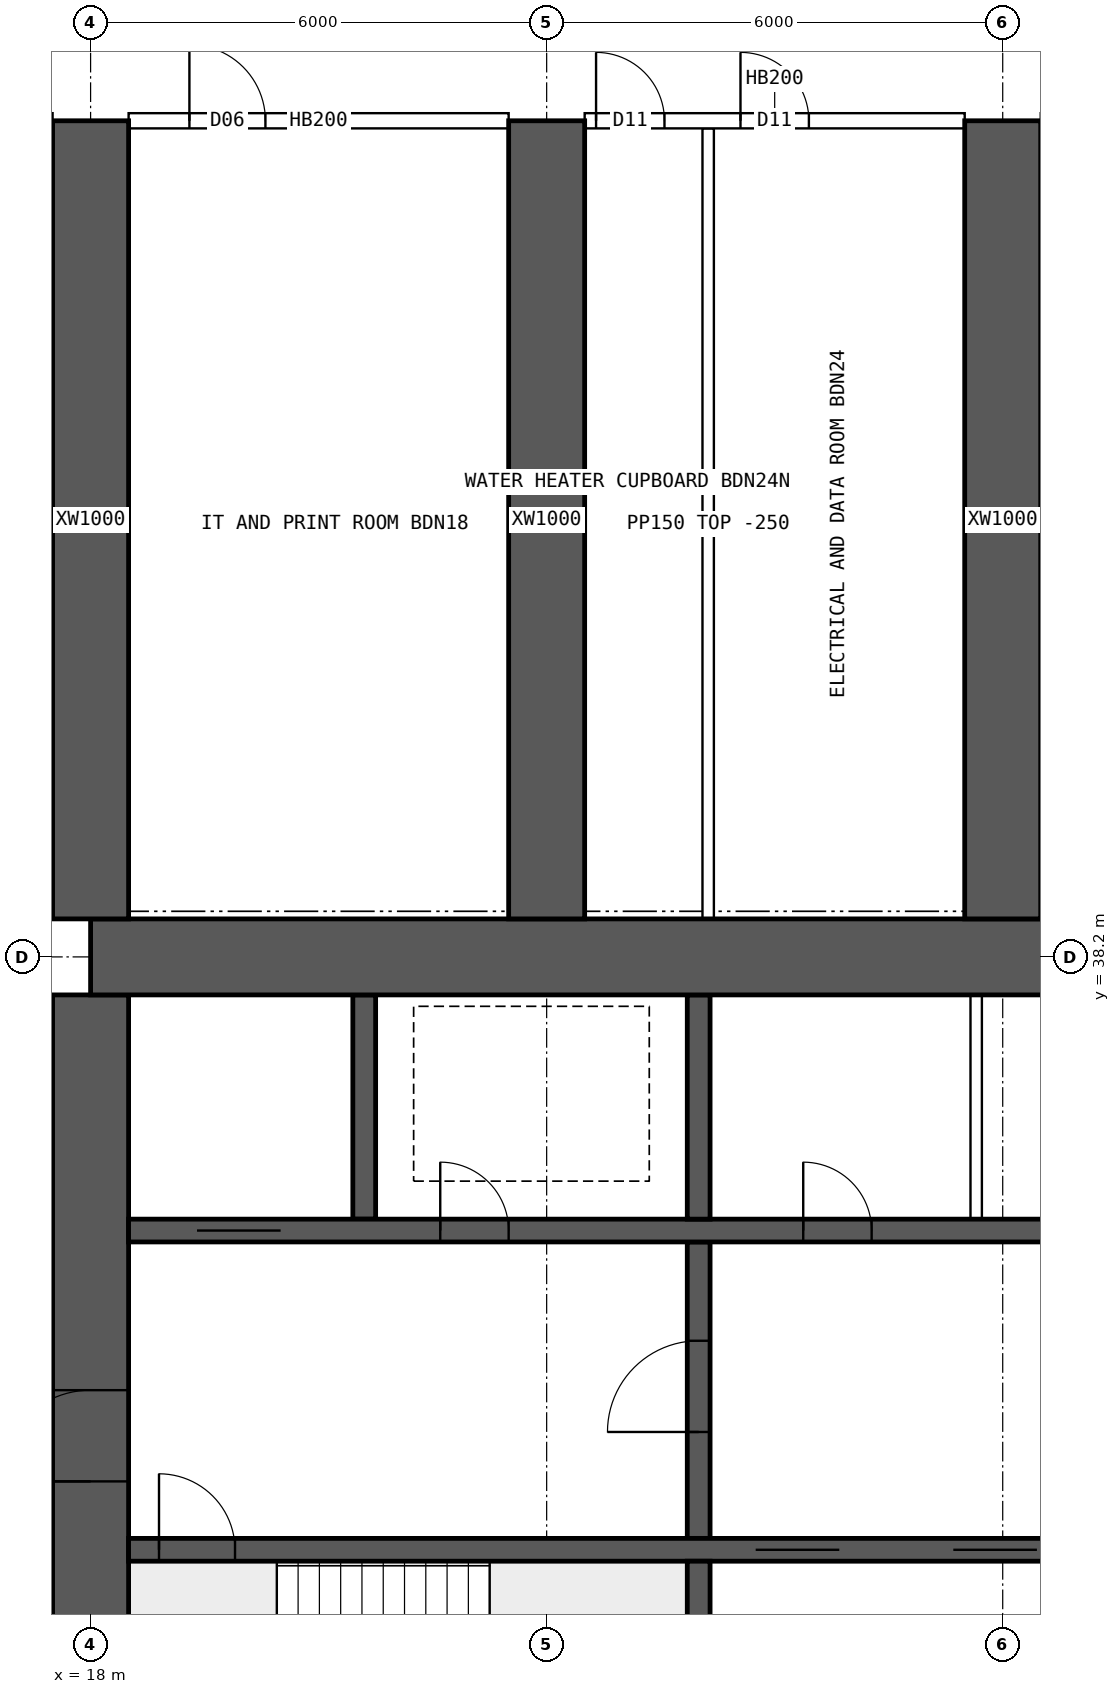
"""IFC4 building model, lengths in metres.
Left out: names, types, materials, properties, quantities, classifications, styles, units other than length and angle.
Written with IfcOpenShell. Run it as: python <this file> out.ifc"""

import sys

from ifc_helpers import new_model, si_unit, direction, frame, frame_2d, origin, place, context, subcontext, project, spatial, rectangle, extrude, element, fill, save


model = new_model("IFC4")
c1 = context("Model", 3, precision=1e-05, world=origin(), true_north=direction((0.0, 1.0)))
c2 = subcontext(c1, "Body", "Model", "MODEL_VIEW")
j1 = project(units=[si_unit("LENGTHUNIT", "METRE"), si_unit("PLANEANGLEUNIT", "RADIAN")], contexts=[c1])
p1 = place(None, origin())
s1 = spatial("IfcSite", under=j1, at=p1, CompositionType="ELEMENT")
p2 = place(p1, origin())
s2 = spatial("IfcBuilding", under=s1, at=p2, CompositionType="ELEMENT")
p3 = place(p2, frame((0.0, 0.0, 23.95)))
s3 = spatial("IfcBuildingStorey", under=s2, at=p3, CompositionType="ELEMENT", Elevation=23.95)
p4 = place(p3, frame((18.0, 38.2, 0.0), z_axis=(0.0, 0.0, 1.0), x_axis=(1.0, 0.0, 0.0)))
e1 = element("IfcWall", 1, at=p4, inside=s3, PredefinedType="SHEAR", context=c2, shape_type="SweptSolid", body=[
    extrude(rectangle(XDim=48.0, YDim=1.0, at=frame_2d((24.0, 0.0))), origin(), (0.0, 0.0, 1.0), 3.75),
])
p5 = place(p3, frame((18.0, 26.3, 0.0), z_axis=(0.0, 0.0, 1.0), x_axis=(0.0, 1.0, 0.0)))
e2 = element("IfcWall", 2, at=p5, inside=s3, PredefinedType="SHEAR", context=c2, shape_type="SweptSolid", body=[
    extrude(rectangle(XDim=11.4, YDim=1.0, at=frame_2d((5.7, 0.0))), origin(), (0.0, 0.0, 1.0), 3.75),
])
p6 = place(p5, frame((5.0, 0.0, 0.0)))
e3 = element("IfcOpeningElement", 3, at=p6, cuts=e2, PredefinedType="OPENING", context=c2, shape_type="SweptSolid", body=[
    extrude(rectangle(XDim=1.2, YDim=2.1, at=frame_2d((0.6, 1.05))), frame((0.0, 0.51, 0.0), z_axis=(0.0, -1.0, 0.0), x_axis=(1.0, 0.0, 0.0)), (0.0, 0.0, 1.0), 1.02),
])
p7 = place(p3, frame((18.5, 30.4, 0.0), z_axis=(0.0, 0.0, 1.0), x_axis=(1.0, 0.0, 0.0)))
e4 = element("IfcWall", 4, at=p7, inside=s3, PredefinedType="SHEAR", context=c2, shape_type="SweptSolid", body=[
    extrude(rectangle(XDim=47.0, YDim=0.3, at=frame_2d((23.5, 0.0))), origin(), (0.0, 0.0, 1.0), 3.75),
])
p8 = place(p7, frame((0.4, 0.0, 0.0)))
e5 = element("IfcOpeningElement", 5, at=p8, cuts=e4, PredefinedType="OPENING", context=c2, shape_type="SweptSolid", body=[
    extrude(rectangle(XDim=1.0, YDim=2.1, at=frame_2d((0.5, 1.05))), frame((0.0, 0.16, 0.0), z_axis=(0.0, -1.0, 0.0), x_axis=(1.0, 0.0, 0.0)), (0.0, 0.0, 1.0), 0.32),
])
p9 = place(p7, frame((45.6, 0.0, 0.0)))
e6 = element("IfcOpeningElement", 6, at=p9, cuts=e4, PredefinedType="OPENING", context=c2, shape_type="SweptSolid", body=[
    extrude(rectangle(XDim=1.0, YDim=2.1, at=frame_2d((0.5, 1.05))), frame((0.0, 0.16, 0.0), z_axis=(0.0, -1.0, 0.0), x_axis=(1.0, 0.0, 0.0)), (0.0, 0.0, 1.0), 0.32),
])
p10 = place(p7, frame((8.25, 0.0, 0.0)))
e7 = element("IfcOpeningElement", 7, at=p10, cuts=e4, PredefinedType="OPENING", context=c2, shape_type="SweptSolid", body=[
    extrude(rectangle(XDim=1.1, YDim=2.1, at=frame_2d((0.55, 1.05))), frame((0.0, 0.16, 0.0), z_axis=(0.0, -1.0, 0.0), x_axis=(1.0, 0.0, 0.0)), (0.0, 0.0, 1.0), 0.32),
])
p11 = place(p7, frame((10.85, 0.0, 0.0)))
e8 = element("IfcOpeningElement", 8, at=p11, cuts=e4, PredefinedType="OPENING", context=c2, shape_type="SweptSolid", body=[
    extrude(rectangle(XDim=1.1, YDim=2.1, at=frame_2d((0.55, 1.05))), frame((0.0, 0.16, 0.0), z_axis=(0.0, -1.0, 0.0), x_axis=(1.0, 0.0, 0.0)), (0.0, 0.0, 1.0), 0.32),
])
p12 = place(p7, frame((13.45, 0.0, 0.0)))
e9 = element("IfcOpeningElement", 9, at=p12, cuts=e4, PredefinedType="OPENING", context=c2, shape_type="SweptSolid", body=[
    extrude(rectangle(XDim=1.1, YDim=2.1, at=frame_2d((0.55, 1.05))), frame((0.0, 0.16, 0.0), z_axis=(0.0, -1.0, 0.0), x_axis=(1.0, 0.0, 0.0)), (0.0, 0.0, 1.0), 0.32),
])
p13 = place(p7, frame((16.05, 0.0, 0.0)))
e10 = element("IfcOpeningElement", 10, at=p13, cuts=e4, PredefinedType="OPENING", context=c2, shape_type="SweptSolid", body=[
    extrude(rectangle(XDim=1.1, YDim=2.1, at=frame_2d((0.55, 1.05))), frame((0.0, 0.16, 0.0), z_axis=(0.0, -1.0, 0.0), x_axis=(1.0, 0.0, 0.0)), (0.0, 0.0, 1.0), 0.32),
])
p14 = place(p7, frame((30.117, 0.0, 0.0)))
e11 = element("IfcOpeningElement", 11, at=p14, cuts=e4, PredefinedType="OPENING", context=c2, shape_type="SweptSolid", body=[
    extrude(rectangle(XDim=1.1, YDim=2.1, at=frame_2d((0.55, 1.05))), frame((0.0, 0.16, 0.0), z_axis=(0.0, -1.0, 0.0), x_axis=(1.0, 0.0, 0.0)), (0.0, 0.0, 1.0), 0.32),
])
p15 = place(p7, frame((33.65, 0.0, 0.0)))
e12 = element("IfcOpeningElement", 12, at=p15, cuts=e4, PredefinedType="OPENING", context=c2, shape_type="SweptSolid", body=[
    extrude(rectangle(XDim=1.1, YDim=2.1, at=frame_2d((0.55, 1.05))), frame((0.0, 0.16, 0.0), z_axis=(0.0, -1.0, 0.0), x_axis=(1.0, 0.0, 0.0)), (0.0, 0.0, 1.0), 0.32),
])
p16 = place(p7, frame((37.183, 0.0, 0.0)))
e13 = element("IfcOpeningElement", 13, at=p16, cuts=e4, PredefinedType="OPENING", context=c2, shape_type="SweptSolid", body=[
    extrude(rectangle(XDim=1.1, YDim=2.1, at=frame_2d((0.55, 1.05))), frame((0.0, 0.16, 0.0), z_axis=(0.0, -1.0, 0.0), x_axis=(1.0, 0.0, 0.0)), (0.0, 0.0, 1.0), 0.32),
])
p17 = place(p3, frame((18.5, 34.6, 0.0), z_axis=(0.0, 0.0, 1.0), x_axis=(1.0, 0.0, 0.0)))
e14 = element("IfcWall", 14, at=p17, inside=s3, PredefinedType="SHEAR", context=c2, shape_type="SweptSolid", body=[
    extrude(rectangle(XDim=47.0, YDim=0.3, at=frame_2d((23.5, 0.0))), origin(), (0.0, 0.0, 1.0), 3.75),
])
p18 = place(p17, frame((0.9, 0.0, 0.0)))
e15 = element("IfcOpeningElement", 15, at=p18, cuts=e14, PredefinedType="OPENING", context=c2, shape_type="SweptSolid", body=[
    extrude(rectangle(XDim=1.1, YDim=2.1, at=frame_2d((0.55, 1.05))), frame((0.0, 0.16, 0.0), z_axis=(0.0, -1.0, 0.0), x_axis=(1.0, 0.0, 0.0)), (0.0, 0.0, 1.0), 0.32),
])
p19 = place(p17, frame((45.0, 0.0, 0.0)))
e16 = element("IfcOpeningElement", 16, at=p19, cuts=e14, PredefinedType="OPENING", context=c2, shape_type="SweptSolid", body=[
    extrude(rectangle(XDim=1.1, YDim=2.1, at=frame_2d((0.55, 1.05))), frame((0.0, 0.16, 0.0), z_axis=(0.0, -1.0, 0.0), x_axis=(1.0, 0.0, 0.0)), (0.0, 0.0, 1.0), 0.32),
])
p20 = place(p17, frame((4.1, 0.0, 0.0)))
e17 = element("IfcOpeningElement", 17, at=p20, cuts=e14, PredefinedType="OPENING", context=c2, shape_type="SweptSolid", body=[
    extrude(rectangle(XDim=0.9, YDim=2.1, at=frame_2d((0.45, 1.05))), frame((0.0, 0.16, 0.0), z_axis=(0.0, -1.0, 0.0), x_axis=(1.0, 0.0, 0.0)), (0.0, 0.0, 1.0), 0.32),
])
p21 = place(p17, frame((42.0, 0.0, 0.0)))
e18 = element("IfcOpeningElement", 18, at=p21, cuts=e14, PredefinedType="OPENING", context=c2, shape_type="SweptSolid", body=[
    extrude(rectangle(XDim=0.9, YDim=2.1, at=frame_2d((0.45, 1.05))), frame((0.0, 0.16, 0.0), z_axis=(0.0, -1.0, 0.0), x_axis=(1.0, 0.0, 0.0)), (0.0, 0.0, 1.0), 0.32),
])
p22 = place(p17, frame((8.875, 0.0, 0.0)))
e19 = element("IfcOpeningElement", 19, at=p22, cuts=e14, PredefinedType="OPENING", context=c2, shape_type="SweptSolid", body=[
    extrude(rectangle(XDim=0.9, YDim=2.1, at=frame_2d((0.45, 1.05))), frame((0.0, 0.16, 0.0), z_axis=(0.0, -1.0, 0.0), x_axis=(1.0, 0.0, 0.0)), (0.0, 0.0, 1.0), 0.32),
])
p23 = place(p17, frame((12.849, 0.0, 0.0)))
e20 = element("IfcOpeningElement", 20, at=p23, cuts=e14, PredefinedType="OPENING", context=c2, shape_type="SweptSolid", body=[
    extrude(rectangle(XDim=0.9, YDim=2.1, at=frame_2d((0.45, 1.05))), frame((0.0, 0.16, 0.0), z_axis=(0.0, -1.0, 0.0), x_axis=(1.0, 0.0, 0.0)), (0.0, 0.0, 1.0), 0.32),
])
p24 = place(p17, frame((16.496, 0.0, 0.0)))
e21 = element("IfcOpeningElement", 21, at=p24, cuts=e14, PredefinedType="OPENING", context=c2, shape_type="SweptSolid", body=[
    extrude(rectangle(XDim=0.9, YDim=2.1, at=frame_2d((0.45, 1.05))), frame((0.0, 0.16, 0.0), z_axis=(0.0, -1.0, 0.0), x_axis=(1.0, 0.0, 0.0)), (0.0, 0.0, 1.0), 0.32),
])
p25 = place(p17, frame((20.255, 0.0, 0.0)))
e22 = element("IfcOpeningElement", 22, at=p25, cuts=e14, PredefinedType="OPENING", context=c2, shape_type="SweptSolid", body=[
    extrude(rectangle(XDim=0.9, YDim=2.1, at=frame_2d((0.45, 1.05))), frame((0.0, 0.16, 0.0), z_axis=(0.0, -1.0, 0.0), x_axis=(1.0, 0.0, 0.0)), (0.0, 0.0, 1.0), 0.32),
])
p26 = place(p17, frame((24.661, 0.0, 0.0)))
e23 = element("IfcOpeningElement", 23, at=p26, cuts=e14, PredefinedType="OPENING", context=c2, shape_type="SweptSolid", body=[
    extrude(rectangle(XDim=0.9, YDim=2.1, at=frame_2d((0.45, 1.05))), frame((0.0, 0.16, 0.0), z_axis=(0.0, -1.0, 0.0), x_axis=(1.0, 0.0, 0.0)), (0.0, 0.0, 1.0), 0.32),
])
p27 = place(p17, frame((27.458, 0.0, 0.0)))
e24 = element("IfcOpeningElement", 24, at=p27, cuts=e14, PredefinedType="OPENING", context=c2, shape_type="SweptSolid", body=[
    extrude(rectangle(XDim=0.9, YDim=2.1, at=frame_2d((0.45, 1.05))), frame((0.0, 0.16, 0.0), z_axis=(0.0, -1.0, 0.0), x_axis=(1.0, 0.0, 0.0)), (0.0, 0.0, 1.0), 0.32),
])
p28 = place(p17, frame((29.831, 0.0, 0.0)))
e25 = element("IfcOpeningElement", 25, at=p28, cuts=e14, PredefinedType="OPENING", context=c2, shape_type="SweptSolid", body=[
    extrude(rectangle(XDim=0.9, YDim=2.1, at=frame_2d((0.45, 1.05))), frame((0.0, 0.16, 0.0), z_axis=(0.0, -1.0, 0.0), x_axis=(1.0, 0.0, 0.0)), (0.0, 0.0, 1.0), 0.32),
])
p29 = place(p17, frame((33.68, 0.0, 0.0)))
e26 = element("IfcOpeningElement", 26, at=p29, cuts=e14, PredefinedType="OPENING", context=c2, shape_type="SweptSolid", body=[
    extrude(rectangle(XDim=0.9, YDim=2.1, at=frame_2d((0.45, 1.05))), frame((0.0, 0.16, 0.0), z_axis=(0.0, -1.0, 0.0), x_axis=(1.0, 0.0, 0.0)), (0.0, 0.0, 1.0), 0.32),
])
p30 = place(p17, frame((37.429, 0.0, 0.0)))
e27 = element("IfcOpeningElement", 27, at=p30, cuts=e14, PredefinedType="OPENING", context=c2, shape_type="SweptSolid", body=[
    extrude(rectangle(XDim=0.9, YDim=2.1, at=frame_2d((0.45, 1.05))), frame((0.0, 0.16, 0.0), z_axis=(0.0, -1.0, 0.0), x_axis=(1.0, 0.0, 0.0)), (0.0, 0.0, 1.0), 0.32),
])
p31 = place(p3, frame((26.0, 26.3, 0.0), z_axis=(0.0, 0.0, 1.0), x_axis=(0.0, 1.0, 0.0)))
e28 = element("IfcWall", 28, at=p31, inside=s3, PredefinedType="SHEAR", context=c2, shape_type="SweptSolid", body=[
    extrude(rectangle(XDim=3.95, YDim=0.3, at=frame_2d((1.975, 0.0))), origin(), (0.0, 0.0, 1.0), 3.75),
])
p32 = place(p3, frame((26.0, 30.55, 0.0), z_axis=(0.0, 0.0, 1.0), x_axis=(0.0, 1.0, 0.0)))
e29 = element("IfcWall", 29, at=p32, inside=s3, PredefinedType="SHEAR", context=c2, shape_type="SweptSolid", body=[
    extrude(rectangle(XDim=3.9, YDim=0.3, at=frame_2d((1.95, 0.0))), origin(), (0.0, 0.0, 1.0), 3.75),
])
p33 = place(p32, frame((1.4, 0.0, 0.0)))
e30 = element("IfcOpeningElement", 30, at=p33, cuts=e29, PredefinedType="OPENING", context=c2, shape_type="SweptSolid", body=[
    extrude(rectangle(XDim=1.2, YDim=2.1, at=frame_2d((0.6, 1.05))), frame((0.0, 0.16, 0.0), z_axis=(0.0, -1.0, 0.0), x_axis=(1.0, 0.0, 0.0)), (0.0, 0.0, 1.0), 0.32),
])
for number, where, z_axis, x_axis in (
    (31, (21.6, 34.75, 0.0), (0.0, 0.0, 1.0), (0.0, 1.0, 0.0)),
    (32, (26.0, 34.75, 0.0), (0.0, 0.0, 1.0), (0.0, 1.0, 0.0)),
):
    element("IfcWall", number, at=place(p3, frame(where, z_axis=z_axis, x_axis=x_axis)), inside=s3, PredefinedType="SHEAR", context=c2, shape_type="SweptSolid", body=[
        extrude(rectangle(XDim=2.95, YDim=0.3, at=frame_2d((1.475, 0.0))), origin(), (0.0, 0.0, 1.0), 3.75),
    ])
for number, where, z_axis, x_axis in (
    (33, (18.0, 38.7, 0.0), (0.0, 0.0, 1.0), (0.0, 1.0, 0.0)),
    (34, (24.0, 38.7, 0.0), (0.0, 0.0, 1.0), (0.0, 1.0, 0.0)),
    (35, (30.0, 38.7, 0.0), (0.0, 0.0, 1.0), (0.0, 1.0, 0.0)),
):
    element("IfcWall", number, at=place(p3, frame(where, z_axis=z_axis, x_axis=x_axis)), inside=s3, PredefinedType="SHEAR", context=c2, shape_type="SweptSolid", body=[
        extrude(rectangle(XDim=10.5, YDim=1.0, at=frame_2d((5.25, 0.0))), origin(), (0.0, 0.0, 1.0), 3.75),
    ])
p34 = place(p3, frame((29.651, 34.75, 0.0), z_axis=(0.0, 0.0, 1.0), x_axis=(0.0, 1.0, 0.0)))
e36 = element("IfcWall", 36, at=p34, inside=s3, PredefinedType="SOLIDWALL", context=c2, shape_type="SweptSolid", body=[
    extrude(rectangle(XDim=2.95, YDim=0.15, at=frame_2d((1.475, 0.0))), origin(), (0.0, 0.0, 1.0), 3.5),
])
p35 = place(p3, frame((18.5, 49.2, 0.0), z_axis=(0.0, 0.0, 1.0), x_axis=(1.0, 0.0, 0.0)))
e37 = element("IfcWall", 37, at=p35, inside=s3, PredefinedType="SOLIDWALL", context=c2, shape_type="SweptSolid", body=[
    extrude(rectangle(XDim=5.0, YDim=0.2, at=frame_2d((2.5, 0.0))), origin(), (0.0, 0.0, 1.0), 3.5),
])
p36 = place(p35, frame((0.8, 0.0, 0.0)))
e38 = element("IfcOpeningElement", 38, at=p36, cuts=e37, PredefinedType="OPENING", context=c2, shape_type="SweptSolid", body=[
    extrude(rectangle(XDim=1.0, YDim=2.1, at=frame_2d((0.5, 1.05))), frame((0.0, 0.11, 0.0), z_axis=(0.0, -1.0, 0.0), x_axis=(1.0, 0.0, 0.0)), (0.0, 0.0, 1.0), 0.22),
])
p37 = place(p3, frame((24.5, 49.2, 0.0), z_axis=(0.0, 0.0, 1.0), x_axis=(1.0, 0.0, 0.0)))
e39 = element("IfcWall", 39, at=p37, inside=s3, PredefinedType="SOLIDWALL", context=c2, shape_type="SweptSolid", body=[
    extrude(rectangle(XDim=5.0, YDim=0.2, at=frame_2d((2.5, 0.0))), origin(), (0.0, 0.0, 1.0), 3.5),
])
p38 = place(p37, frame((0.15, 0.0, 0.0)))
e40 = element("IfcOpeningElement", 40, at=p38, cuts=e39, PredefinedType="OPENING", context=c2, shape_type="SweptSolid", body=[
    extrude(rectangle(XDim=0.9, YDim=2.1, at=frame_2d((0.45, 1.05))), frame((0.0, 0.11, 0.0), z_axis=(0.0, -1.0, 0.0), x_axis=(1.0, 0.0, 0.0)), (0.0, 0.0, 1.0), 0.22),
])
p39 = place(p37, frame((2.05, 0.0, 0.0)))
e41 = element("IfcOpeningElement", 41, at=p39, cuts=e39, PredefinedType="OPENING", context=c2, shape_type="SweptSolid", body=[
    extrude(rectangle(XDim=0.9, YDim=2.1, at=frame_2d((0.45, 1.05))), frame((0.0, 0.11, 0.0), z_axis=(0.0, -1.0, 0.0), x_axis=(1.0, 0.0, 0.0)), (0.0, 0.0, 1.0), 0.22),
])
p40 = place(p3, frame((30.5, 49.2, 0.0), z_axis=(0.0, 0.0, 1.0), x_axis=(1.0, 0.0, 0.0)))
e42 = element("IfcWall", 42, at=p40, inside=s3, PredefinedType="SOLIDWALL", context=c2, shape_type="SweptSolid", body=[
    extrude(rectangle(XDim=5.0, YDim=0.2, at=frame_2d((2.5, 0.0))), origin(), (0.0, 0.0, 1.0), 3.5),
])
p41 = place(p40, frame((0.35, 0.0, 0.0)))
e43 = element("IfcOpeningElement", 43, at=p41, cuts=e42, PredefinedType="OPENING", context=c2, shape_type="SweptSolid", body=[
    extrude(rectangle(XDim=0.9, YDim=2.1, at=frame_2d((0.45, 1.05))), frame((0.0, 0.11, 0.0), z_axis=(0.0, -1.0, 0.0), x_axis=(1.0, 0.0, 0.0)), (0.0, 0.0, 1.0), 0.22),
])
p42 = place(p40, frame((3.86, 0.0, 0.0)))
e44 = element("IfcOpeningElement", 44, at=p42, cuts=e42, PredefinedType="OPENING", context=c2, shape_type="SweptSolid", body=[
    extrude(rectangle(XDim=0.9, YDim=2.1, at=frame_2d((0.45, 1.05))), frame((0.0, 0.11, 0.0), z_axis=(0.0, -1.0, 0.0), x_axis=(1.0, 0.0, 0.0)), (0.0, 0.0, 1.0), 0.22),
])
p43 = place(p3, frame((26.125, 38.7, 0.0), z_axis=(0.0, 0.0, 1.0), x_axis=(0.0, 1.0, 0.0)))
e45 = element("IfcWall", 45, at=p43, inside=s3, PredefinedType="PARTITIONING", context=c2, shape_type="SweptSolid", body=[
    extrude(rectangle(XDim=10.4, YDim=0.15, at=frame_2d((5.2, 0.0))), origin(), (0.0, 0.0, 1.0), 3.5),
])
p44 = place(p6, origin())
e46 = element("IfcDoor", 46, at=p44, inside=s3, OperationType="SINGLE_SWING_LEFT", PredefinedType="DOOR", context=c2, shape_type="SweptSolid", body=[
    extrude(rectangle(XDim=1.2, YDim=2.1, at=frame_2d((0.6, 1.05))), frame((0.0, 0.025, 0.0), z_axis=(0.0, -1.0, 0.0), x_axis=(1.0, 0.0, 0.0)), (0.0, 0.0, 1.0), 0.05),
])
fill(e3, e46)
p45 = place(p8, origin())
e47 = element("IfcDoor", 47, at=p45, inside=s3, OperationType="SINGLE_SWING_LEFT", PredefinedType="DOOR", context=c2, shape_type="SweptSolid", body=[
    extrude(rectangle(XDim=1.0, YDim=2.1, at=frame_2d((0.5, 1.05))), frame((0.0, 0.025, 0.0), z_axis=(0.0, -1.0, 0.0), x_axis=(1.0, 0.0, 0.0)), (0.0, 0.0, 1.0), 0.05),
])
fill(e5, e47)
p46 = place(p18, origin())
e48 = element("IfcDoor", 48, at=p46, inside=s3, OperationType="DOUBLE_DOOR_SLIDING", PredefinedType="DOOR", context=c2, shape_type="SweptSolid", body=[
    extrude(rectangle(XDim=1.1, YDim=2.1, at=frame_2d((0.55, 1.05))), frame((0.0, 0.025, 0.0), z_axis=(0.0, -1.0, 0.0), x_axis=(1.0, 0.0, 0.0)), (0.0, 0.0, 1.0), 0.05),
])
fill(e15, e48)
p47 = place(p20, origin())
e49 = element("IfcDoor", 49, at=p47, inside=s3, OperationType="SINGLE_SWING_LEFT", PredefinedType="DOOR", context=c2, shape_type="SweptSolid", body=[
    extrude(rectangle(XDim=0.9, YDim=2.1, at=frame_2d((0.45, 1.05))), frame((0.0, 0.025, 0.0), z_axis=(0.0, -1.0, 0.0), x_axis=(1.0, 0.0, 0.0)), (0.0, 0.0, 1.0), 0.05),
])
fill(e17, e49)
p48 = place(p33, origin())
e50 = element("IfcDoor", 50, at=p48, inside=s3, OperationType="SINGLE_SWING_LEFT", PredefinedType="DOOR", context=c2, shape_type="SweptSolid", body=[
    extrude(rectangle(XDim=1.2, YDim=2.1, at=frame_2d((0.6, 1.05))), frame((0.0, 0.025, 0.0), z_axis=(0.0, -1.0, 0.0), x_axis=(1.0, 0.0, 0.0)), (0.0, 0.0, 1.0), 0.05),
])
fill(e30, e50)
p49 = place(p22, origin())
e51 = element("IfcDoor", 51, at=p49, inside=s3, OperationType="SINGLE_SWING_LEFT", PredefinedType="DOOR", context=c2, shape_type="SweptSolid", body=[
    extrude(rectangle(XDim=0.9, YDim=2.1, at=frame_2d((0.45, 1.05))), frame((0.0, 0.025, 0.0), z_axis=(0.0, -1.0, 0.0), x_axis=(1.0, 0.0, 0.0)), (0.0, 0.0, 1.0), 0.05),
])
fill(e19, e51)
p50 = place(p10, origin())
e52 = element("IfcDoor", 52, at=p50, inside=s3, OperationType="DOUBLE_DOOR_SLIDING", PredefinedType="DOOR", context=c2, shape_type="SweptSolid", body=[
    extrude(rectangle(XDim=1.1, YDim=2.1, at=frame_2d((0.55, 1.05))), frame((0.0, 0.025, 0.0), z_axis=(0.0, -1.0, 0.0), x_axis=(1.0, 0.0, 0.0)), (0.0, 0.0, 1.0), 0.05),
])
fill(e7, e52)
p51 = place(p11, origin())
e53 = element("IfcDoor", 53, at=p51, inside=s3, OperationType="DOUBLE_DOOR_SLIDING", PredefinedType="DOOR", context=c2, shape_type="SweptSolid", body=[
    extrude(rectangle(XDim=1.1, YDim=2.1, at=frame_2d((0.55, 1.05))), frame((0.0, 0.025, 0.0), z_axis=(0.0, -1.0, 0.0), x_axis=(1.0, 0.0, 0.0)), (0.0, 0.0, 1.0), 0.05),
])
fill(e8, e53)
p52 = place(p36, origin())
e54 = element("IfcDoor", 54, at=p52, inside=s3, OperationType="SINGLE_SWING_LEFT", PredefinedType="DOOR", context=c2, shape_type="SweptSolid", body=[
    extrude(rectangle(XDim=1.0, YDim=2.1, at=frame_2d((0.5, 1.05))), frame((0.0, 0.025, 0.0), z_axis=(0.0, -1.0, 0.0), x_axis=(1.0, 0.0, 0.0)), (0.0, 0.0, 1.0), 0.05),
])
fill(e38, e54)
p53 = place(p38, origin())
e55 = element("IfcDoor", 55, at=p53, inside=s3, OperationType="SINGLE_SWING_LEFT", PredefinedType="DOOR", context=c2, shape_type="SweptSolid", body=[
    extrude(rectangle(XDim=0.9, YDim=2.1, at=frame_2d((0.45, 1.05))), frame((0.0, 0.025, 0.0), z_axis=(0.0, -1.0, 0.0), x_axis=(1.0, 0.0, 0.0)), (0.0, 0.0, 1.0), 0.05),
])
fill(e40, e55)
p54 = place(p39, origin())
e56 = element("IfcDoor", 56, at=p54, inside=s3, OperationType="SINGLE_SWING_LEFT", PredefinedType="DOOR", context=c2, shape_type="SweptSolid", body=[
    extrude(rectangle(XDim=0.9, YDim=2.1, at=frame_2d((0.45, 1.05))), frame((0.0, 0.025, 0.0), z_axis=(0.0, -1.0, 0.0), x_axis=(1.0, 0.0, 0.0)), (0.0, 0.0, 1.0), 0.05),
])
fill(e41, e56)
save(model, sys.argv[1])
